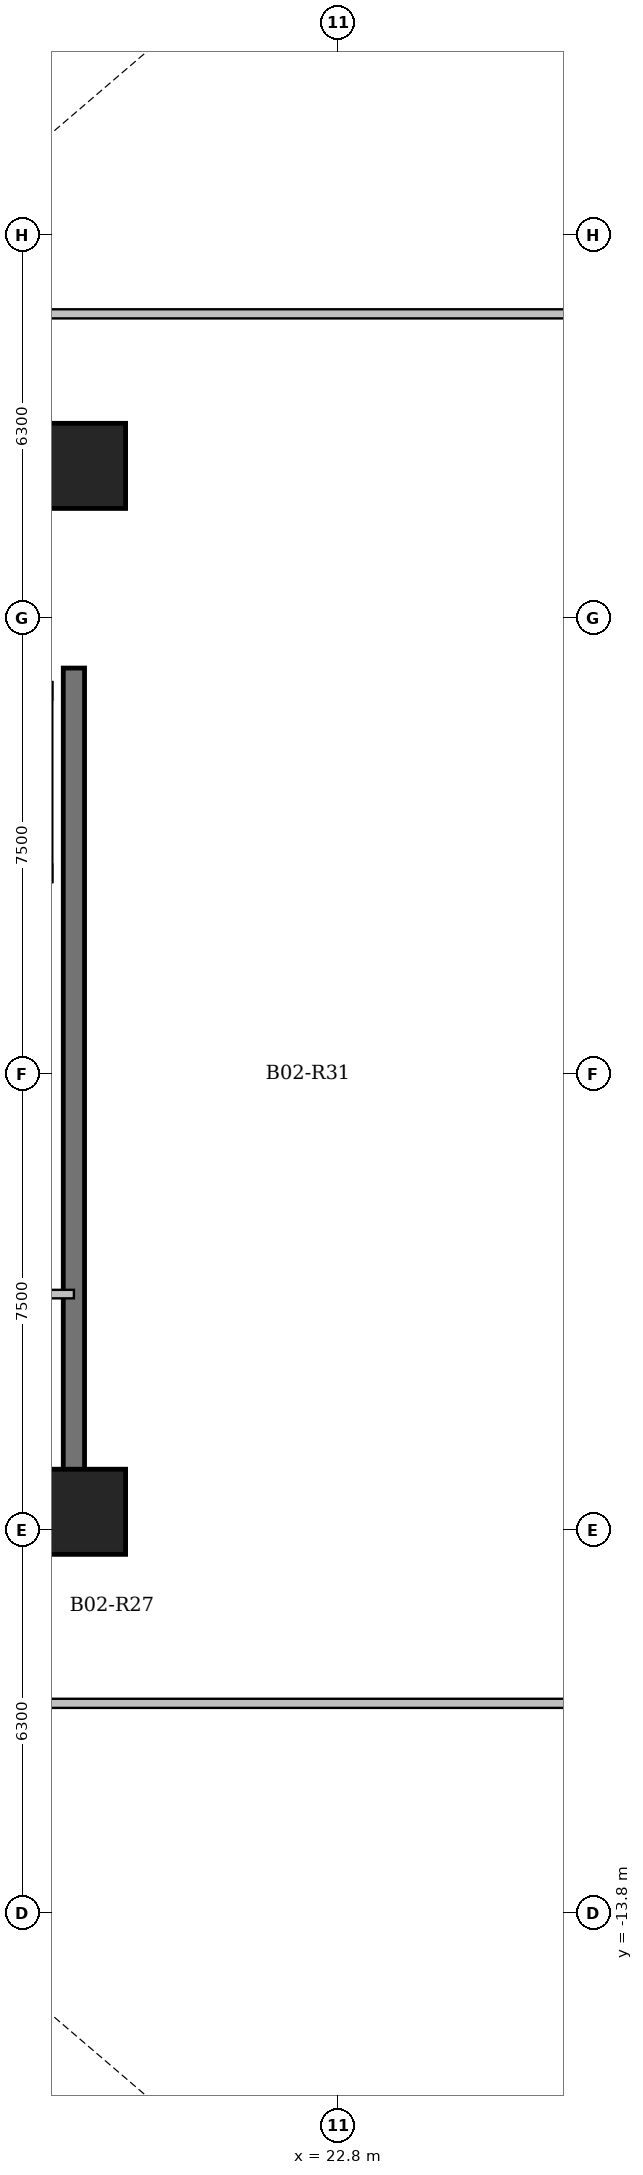
"""IFC4 building model, lengths in metres.
Left out: names, types, materials, properties, quantities, classifications, styles, units other than length and angle.
Written with IfcOpenShell. Run it as: python <this file> out.ifc"""

import sys

from ifc_helpers import new_model, si_unit, direction, frame, frame_2d, origin, origin_2d, place, context, subcontext, project, spatial, rectangle, extrude, element, save


model = new_model("IFC4")
c1 = context("Model", 3, precision=1e-05, world=origin(), true_north=direction((0.0, 1.0)))
c2 = subcontext(c1, "Body", "Model", "MODEL_VIEW")
j1 = project(units=[si_unit("LENGTHUNIT", "METRE"), si_unit("PLANEANGLEUNIT", "RADIAN")], contexts=[c1])
p1 = place(None, origin())
s1 = spatial("IfcSite", under=j1, at=p1, CompositionType="ELEMENT")
p2 = place(p1, origin())
s2 = spatial("IfcBuilding", under=s1, at=p2, CompositionType="ELEMENT")
p3 = place(p2, frame((0.0, 0.0, -9.2)))
s3 = spatial("IfcBuildingStorey", under=s2, at=p3, CompositionType="ELEMENT", Elevation=-9.2)
for number, where, z_axis, x_axis in (
    (1, (18.6, -7.2, 0.0), (0.0, 0.0, 1.0), (1.0, 0.0, 0.0)),
    (2, (18.6, 10.0, 0.0), (0.0, 0.0, 1.0), (1.0, 0.0, 0.0)),
):
    element("IfcColumn", number, at=place(p3, frame(where, z_axis=z_axis, x_axis=x_axis)), inside=s3, PredefinedType="COLUMN", context=c2, shape_type="SweptSolid", body=[
        extrude(rectangle(XDim=1.4, YDim=1.4, at=origin_2d()), origin(), (0.0, 0.0, 1.0), 4.6),
    ])
p4 = place(p3, frame((18.45, -7.375, 0.0), z_axis=(0.0, 0.0, 1.0), x_axis=(0.0, 1.0, 0.0)))
e3 = element("IfcWall", 3, at=p4, inside=s3, PredefinedType="SHEAR", context=c2, shape_type="SweptSolid", body=[
    extrude(rectangle(XDim=14.05, YDim=0.35, at=frame_2d((7.025, 0.0))), origin(), (0.0, 0.0, 1.0), 4.6),
])
p5 = place(p3, frame((10.075, -7.2, 0.0), z_axis=(0.0, 0.0, 1.0), x_axis=(1.0, 0.0, 0.0)))
e4 = element("IfcWall", 4, at=p5, inside=s3, PredefinedType="SHEAR", context=c2, shape_type="SweptSolid", body=[
    extrude(rectangle(XDim=8.55, YDim=0.35, at=frame_2d((4.275, 0.0))), origin(), (0.0, 0.0, 1.0), 4.6),
])
p6 = place(p3, frame((15.4, -3.62, 0.0), z_axis=(0.0, 0.0, 1.0), x_axis=(1.0, 0.0, 0.0)))
e5 = element("IfcWall", 5, at=p6, inside=s3, PredefinedType="PARTITIONING", context=c2, shape_type="SweptSolid", body=[
    extrude(rectangle(XDim=3.05, YDim=0.14, at=frame_2d((1.525, 0.0))), origin(), (0.0, 0.0, 1.0), 4.3),
])
p7 = place(p6, frame((1.05, 0.0, 0.0)))
e6 = element("IfcOpeningElement", 6, at=p7, cuts=e5, PredefinedType="OPENING", context=c2, shape_type="SweptSolid", body=[
    extrude(rectangle(XDim=0.9, YDim=2.08, at=frame_2d((0.45, 1.04))), frame((0.0, 0.08, 0.0), z_axis=(0.0, -1.0, 0.0), x_axis=(1.0, 0.0, 0.0)), (0.0, 0.0, 1.0), 0.16),
])
p8 = place(p3, frame((3.85, 12.5, 0.0), z_axis=(0.0, 0.0, 1.0), x_axis=(1.0, 0.0, 0.0)))
e7 = element("IfcWall", 7, at=p8, inside=s3, PredefinedType="PARTITIONING", context=c2, shape_type="SweptSolid", body=[
    extrude(rectangle(XDim=24.15, YDim=0.15, at=frame_2d((12.075, 0.0))), origin(), (0.0, 0.0, 1.0), 4.3),
])
p9 = place(p3, frame((8.55, -10.35, 0.0), z_axis=(0.0, 0.0, 1.0), x_axis=(1.0, 0.0, 0.0)))
e8 = element("IfcWall", 8, at=p9, inside=s3, PredefinedType="PARTITIONING", context=c2, shape_type="SweptSolid", body=[
    extrude(rectangle(XDim=19.45, YDim=0.15, at=frame_2d((9.725, 0.0))), origin(), (0.0, 0.0, 1.0), 4.3),
])
p10 = place(p9, frame((3.2, 0.0, 0.0)))
e9 = element("IfcOpeningElement", 9, at=p10, cuts=e8, PredefinedType="OPENING", context=c2, shape_type="SweptSolid", body=[
    extrude(rectangle(XDim=1.12, YDim=2.15, at=frame_2d((0.56, 1.075))), frame((0.0, 0.085, 0.0), z_axis=(0.0, -1.0, 0.0), x_axis=(1.0, 0.0, 0.0)), (0.0, 0.0, 1.0), 0.17),
])
save(model, sys.argv[1])
